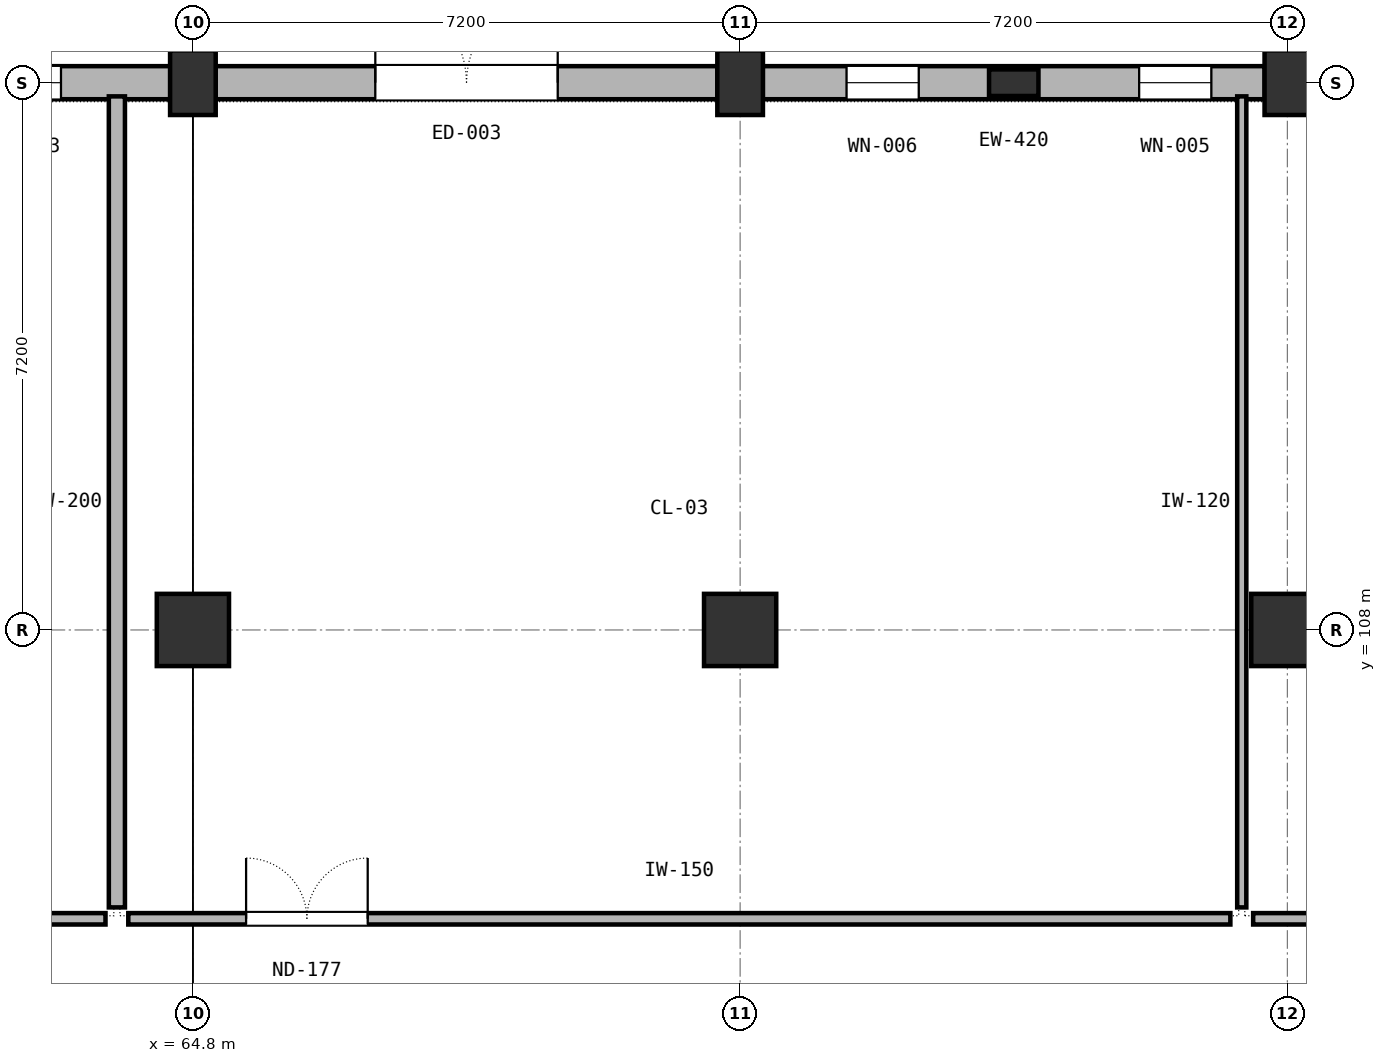
"""IFC4 building model, lengths in metres.
Left out: names, types, materials, properties, quantities, classifications, styles, units other than length and angle.
Written with IfcOpenShell. Run it as: python <this file> out.ifc"""

import sys

from ifc_helpers import new_model, si_unit, direction, frame, frame_2d, origin, origin_2d, place, context, subcontext, project, spatial, rectangle, extrude, element, fill, save


model = new_model("IFC4")
c1 = context("Model", 3, precision=1e-05, world=origin(), true_north=direction((0.0, 1.0)))
c2 = subcontext(c1, "Body", "Model", "MODEL_VIEW")
j1 = project(units=[si_unit("LENGTHUNIT", "METRE"), si_unit("PLANEANGLEUNIT", "RADIAN")], contexts=[c1])
p1 = place(None, origin())
s1 = spatial("IfcSite", under=j1, at=p1, CompositionType="ELEMENT")
p2 = place(p1, origin())
s2 = spatial("IfcBuilding", under=s1, at=p2, CompositionType="ELEMENT")
p3 = place(p2, origin())
s3 = spatial("IfcBuildingStorey", under=s2, at=p3, CompositionType="ELEMENT", Elevation=0.0)
p4 = place(p3, frame((64.8, 108.0, 0.0), z_axis=(0.0, 0.0, 1.0), x_axis=(1.0, 0.0, 0.0)))
e1 = element("IfcColumn", 1, at=p4, inside=s3, PredefinedType="COLUMN", context=c2, shape_type="SweptSolid", body=[
    extrude(rectangle(XDim=0.95, YDim=0.95, at=origin_2d()), origin(), (0.0, 0.0, 1.0), 5.4),
])
p5 = place(p3, frame((64.8, 115.2, 0.0), z_axis=(0.0, 0.0, 1.0), x_axis=(1.0, 0.0, 0.0)))
e2 = element("IfcColumn", 2, at=p5, inside=s3, PredefinedType="COLUMN", context=c2, shape_type="SweptSolid", body=[
    extrude(rectangle(XDim=0.6, YDim=0.85, at=origin_2d()), origin(), (0.0, 0.0, 1.0), 5.4),
])
p6 = place(p3, frame((72.0, 108.0, 0.0), z_axis=(0.0, 0.0, 1.0), x_axis=(1.0, 0.0, 0.0)))
e3 = element("IfcColumn", 3, at=p6, inside=s3, PredefinedType="COLUMN", context=c2, shape_type="SweptSolid", body=[
    extrude(rectangle(XDim=0.95, YDim=0.95, at=origin_2d()), origin(), (0.0, 0.0, 1.0), 5.4),
])
p7 = place(p3, frame((72.0, 115.2, 0.0), z_axis=(0.0, 0.0, 1.0), x_axis=(1.0, 0.0, 0.0)))
e4 = element("IfcColumn", 4, at=p7, inside=s3, PredefinedType="COLUMN", context=c2, shape_type="SweptSolid", body=[
    extrude(rectangle(XDim=0.6, YDim=0.85, at=origin_2d()), origin(), (0.0, 0.0, 1.0), 5.4),
])
p8 = place(p3, frame((79.2, 108.0, 0.0), z_axis=(0.0, 0.0, 1.0), x_axis=(1.0, 0.0, 0.0)))
e5 = element("IfcColumn", 5, at=p8, inside=s3, PredefinedType="COLUMN", context=c2, shape_type="SweptSolid", body=[
    extrude(rectangle(XDim=0.95, YDim=0.95, at=origin_2d()), origin(), (0.0, 0.0, 1.0), 5.4),
])
p9 = place(p3, frame((79.2, 115.2, 0.0), z_axis=(0.0, 0.0, 1.0), x_axis=(1.0, 0.0, 0.0)))
e6 = element("IfcColumn", 6, at=p9, inside=s3, PredefinedType="COLUMN", context=c2, shape_type="SweptSolid", body=[
    extrude(rectangle(XDim=0.6, YDim=0.85, at=origin_2d()), origin(), (0.0, 0.0, 1.0), 5.4),
])
p10 = place(p3, frame((75.6, 115.2, 0.0), z_axis=(0.0, 0.0, 1.0), x_axis=(1.0, 0.0, 0.0)))
e7 = element("IfcColumn", 7, at=p10, inside=s3, PredefinedType="PILASTER", context=c2, shape_type="SweptSolid", body=[
    extrude(rectangle(XDim=0.65, YDim=0.35, at=origin_2d()), origin(), (0.0, 0.0, 1.0), 5.4),
])
p11 = place(p3, frame((64.502, 115.2, 0.0), z_axis=(0.0, 0.0, 1.0), x_axis=(-1.0, 0.0, 0.0)))
e8 = element("IfcWall", 8, at=p11, inside=s3, PredefinedType="SOLIDWALL", context=c2, shape_type="SweptSolid", body=[
    extrude(rectangle(XDim=6.604, YDim=0.435, at=frame_2d((3.302, 0.0))), origin(), (0.0, 0.0, 1.0), 4.1),
])
p12 = place(p11, frame((1.438, 0.0, 0.7)))
e9 = element("IfcOpeningElement", 9, at=p12, cuts=e8, PredefinedType="OPENING", context=c2, shape_type="SweptSolid", body=[
    extrude(rectangle(XDim=0.95, YDim=2.6, at=frame_2d((0.475, 1.3))), frame((0.0, 0.228, 0.0), z_axis=(0.0, -1.0, 0.0), x_axis=(1.0, 0.0, 0.0)), (0.0, 0.0, 1.0), 0.455),
])
p13 = place(p11, frame((4.552, 0.0, 0.7)))
e10 = element("IfcOpeningElement", 10, at=p13, cuts=e8, PredefinedType="OPENING", context=c2, shape_type="SweptSolid", body=[
    extrude(rectangle(XDim=0.95, YDim=2.6, at=frame_2d((0.475, 1.3))), frame((0.0, 0.228, 0.0), z_axis=(0.0, -1.0, 0.0), x_axis=(1.0, 0.0, 0.0)), (0.0, 0.0, 1.0), 0.455),
])
p14 = place(p3, frame((71.702, 115.2, 0.0), z_axis=(0.0, 0.0, 1.0), x_axis=(-1.0, 0.0, 0.0)))
e11 = element("IfcWall", 11, at=p14, inside=s3, PredefinedType="SOLIDWALL", context=c2, shape_type="SweptSolid", body=[
    extrude(rectangle(XDim=6.604, YDim=0.435, at=frame_2d((3.302, 0.0))), origin(), (0.0, 0.0, 1.0), 4.1),
])
p15 = place(p14, frame((2.102, 0.0, 0.0)))
e12 = element("IfcOpeningElement", 12, at=p15, cuts=e11, PredefinedType="OPENING", context=c2, shape_type="SweptSolid", body=[
    extrude(rectangle(XDim=2.4, YDim=2.8, at=frame_2d((1.2, 1.4))), frame((0.0, 0.228, 0.0), z_axis=(0.0, -1.0, 0.0), x_axis=(1.0, 0.0, 0.0)), (0.0, 0.0, 1.0), 0.455),
])
p16 = place(p3, frame((78.902, 115.2, 0.0), z_axis=(0.0, 0.0, 1.0), x_axis=(-1.0, 0.0, 0.0)))
e13 = element("IfcWall", 13, at=p16, inside=s3, PredefinedType="SOLIDWALL", context=c2, shape_type="SweptSolid", body=[
    extrude(rectangle(XDim=6.604, YDim=0.435, at=frame_2d((3.302, 0.0))), origin(), (0.0, 0.0, 1.0), 4.1),
])
p17 = place(p16, frame((0.702, 0.0, 0.7)))
e14 = element("IfcOpeningElement", 14, at=p17, cuts=e13, PredefinedType="OPENING", context=c2, shape_type="SweptSolid", body=[
    extrude(rectangle(XDim=0.95, YDim=2.6, at=frame_2d((0.475, 1.3))), frame((0.0, 0.228, 0.0), z_axis=(0.0, -1.0, 0.0), x_axis=(1.0, 0.0, 0.0)), (0.0, 0.0, 1.0), 0.455),
])
p18 = place(p16, frame((4.552, 0.0, 0.7)))
e15 = element("IfcOpeningElement", 15, at=p18, cuts=e13, PredefinedType="OPENING", context=c2, shape_type="SweptSolid", body=[
    extrude(rectangle(XDim=0.95, YDim=2.6, at=frame_2d((0.475, 1.3))), frame((0.0, 0.228, 0.0), z_axis=(0.0, -1.0, 0.0), x_axis=(1.0, 0.0, 0.0)), (0.0, 0.0, 1.0), 0.455),
])
p19 = place(p3, frame((50.15, 104.2, 0.0), z_axis=(0.0, 0.0, 1.0), x_axis=(1.0, 0.0, 0.0)))
e16 = element("IfcWall", 16, at=p19, inside=s3, PredefinedType="PARTITIONING", context=c2, shape_type="SweptSolid", body=[
    extrude(rectangle(XDim=13.5, YDim=0.15, at=frame_2d((6.75, 0.0))), origin(), (0.0, 0.0, 1.0), 4.12),
])
p20 = place(p19, frame((1.65, 0.0, 0.0)))
e17 = element("IfcOpeningElement", 17, at=p20, cuts=e16, PredefinedType="OPENING", context=c2, shape_type="SweptSolid", body=[
    extrude(rectangle(XDim=1.4, YDim=2.2, at=frame_2d((0.7, 1.1))), frame((0.0, 0.085, 0.0), z_axis=(0.0, -1.0, 0.0), x_axis=(1.0, 0.0, 0.0)), (0.0, 0.0, 1.0), 0.17),
])
p21 = place(p3, frame((63.95, 104.2, 0.0), z_axis=(0.0, 0.0, 1.0), x_axis=(1.0, 0.0, 0.0)))
e18 = element("IfcWall", 18, at=p21, inside=s3, PredefinedType="PARTITIONING", context=c2, shape_type="SweptSolid", body=[
    extrude(rectangle(XDim=14.5, YDim=0.15, at=frame_2d((7.25, 0.0))), origin(), (0.0, 0.0, 1.0), 4.12),
])
p22 = place(p21, frame((1.55, 0.0, 0.0)))
e19 = element("IfcOpeningElement", 19, at=p22, cuts=e18, PredefinedType="OPENING", context=c2, shape_type="SweptSolid", body=[
    extrude(rectangle(XDim=1.6, YDim=2.2, at=frame_2d((0.8, 1.1))), frame((0.0, 0.085, 0.0), z_axis=(0.0, -1.0, 0.0), x_axis=(1.0, 0.0, 0.0)), (0.0, 0.0, 1.0), 0.17),
])
p23 = place(p3, frame((63.8, 104.35, 0.0), z_axis=(0.0, 0.0, 1.0), x_axis=(0.0, 1.0, 0.0)))
e20 = element("IfcWall", 20, at=p23, inside=s3, PredefinedType="PARTITIONING", context=c2, shape_type="SweptSolid", body=[
    extrude(rectangle(XDim=10.67, YDim=0.212, at=frame_2d((5.335, 0.0))), origin(), (0.0, 0.0, 1.0), 4.12),
])
p24 = place(p3, frame((78.75, 104.2, 0.0), z_axis=(0.0, 0.0, 1.0), x_axis=(1.0, 0.0, 0.0)))
e21 = element("IfcWall", 21, at=p24, inside=s3, PredefinedType="PARTITIONING", context=c2, shape_type="SweptSolid", body=[
    extrude(rectangle(XDim=12.9, YDim=0.15, at=frame_2d((6.45, 0.0))), origin(), (0.0, 0.0, 1.0), 4.12),
])
p25 = place(p24, frame((1.85, 0.0, 0.0)))
e22 = element("IfcOpeningElement", 22, at=p25, cuts=e21, PredefinedType="OPENING", context=c2, shape_type="SweptSolid", body=[
    extrude(rectangle(XDim=1.0, YDim=2.15, at=frame_2d((0.5, 1.075))), frame((0.0, 0.085, 0.0), z_axis=(0.0, -1.0, 0.0), x_axis=(1.0, 0.0, 0.0)), (0.0, 0.0, 1.0), 0.17),
])
p26 = place(p3, frame((78.6, 104.35, 0.0), z_axis=(0.0, 0.0, 1.0), x_axis=(0.0, 1.0, 0.0)))
e23 = element("IfcWall", 23, at=p26, inside=s3, PredefinedType="PARTITIONING", context=c2, shape_type="SweptSolid", body=[
    extrude(rectangle(XDim=10.67, YDim=0.12, at=frame_2d((5.335, 0.0))), origin(), (0.0, 0.0, 1.0), 4.12),
])
p27 = place(p12, origin())
e24 = element("IfcWindow", 24, at=p27, inside=s3, PartitioningType="SINGLE_PANEL", PredefinedType="WINDOW", context=c2, shape_type="SweptSolid", body=[
    extrude(rectangle(XDim=0.95, YDim=2.6, at=frame_2d((0.475, 1.3))), frame((0.0, 0.03, 0.0), z_axis=(0.0, -1.0, 0.0), x_axis=(1.0, 0.0, 0.0)), (0.0, 0.0, 1.0), 0.06),
])
fill(e9, e24)
p28 = place(p15, frame((2.4, 0.0, 0.0), z_axis=(0.0, 0.0, 1.0), x_axis=(-1.0, 0.0, 0.0)))
e25 = element("IfcDoor", 25, at=p28, inside=s3, OperationType="DOUBLE_DOOR_SINGLE_SWING", PredefinedType="DOOR", context=c2, shape_type="SweptSolid", body=[
    extrude(rectangle(XDim=2.4, YDim=2.8, at=frame_2d((1.2, 1.4))), frame((0.0, 0.025, 0.0), z_axis=(0.0, -1.0, 0.0), x_axis=(1.0, 0.0, 0.0)), (0.0, 0.0, 1.0), 0.05),
])
fill(e12, e25)
p29 = place(p17, origin())
e26 = element("IfcWindow", 26, at=p29, inside=s3, PartitioningType="SINGLE_PANEL", PredefinedType="WINDOW", context=c2, shape_type="SweptSolid", body=[
    extrude(rectangle(XDim=0.95, YDim=2.6, at=frame_2d((0.475, 1.3))), frame((0.0, 0.03, 0.0), z_axis=(0.0, -1.0, 0.0), x_axis=(1.0, 0.0, 0.0)), (0.0, 0.0, 1.0), 0.06),
])
fill(e14, e26)
p30 = place(p18, origin())
e27 = element("IfcWindow", 27, at=p30, inside=s3, PartitioningType="SINGLE_PANEL", PredefinedType="WINDOW", context=c2, shape_type="SweptSolid", body=[
    extrude(rectangle(XDim=0.95, YDim=2.6, at=frame_2d((0.475, 1.3))), frame((0.0, 0.03, 0.0), z_axis=(0.0, -1.0, 0.0), x_axis=(1.0, 0.0, 0.0)), (0.0, 0.0, 1.0), 0.06),
])
fill(e15, e27)
p31 = place(p22, origin())
e28 = element("IfcDoor", 28, at=p31, inside=s3, OperationType="DOUBLE_DOOR_SINGLE_SWING", PredefinedType="DOOR", context=c2, shape_type="SweptSolid", body=[
    extrude(rectangle(XDim=1.6, YDim=2.2, at=frame_2d((0.8, 1.1))), frame((0.0, 0.025, 0.0), z_axis=(0.0, -1.0, 0.0), x_axis=(1.0, 0.0, 0.0)), (0.0, 0.0, 1.0), 0.05),
])
fill(e19, e28)
save(model, sys.argv[1])
